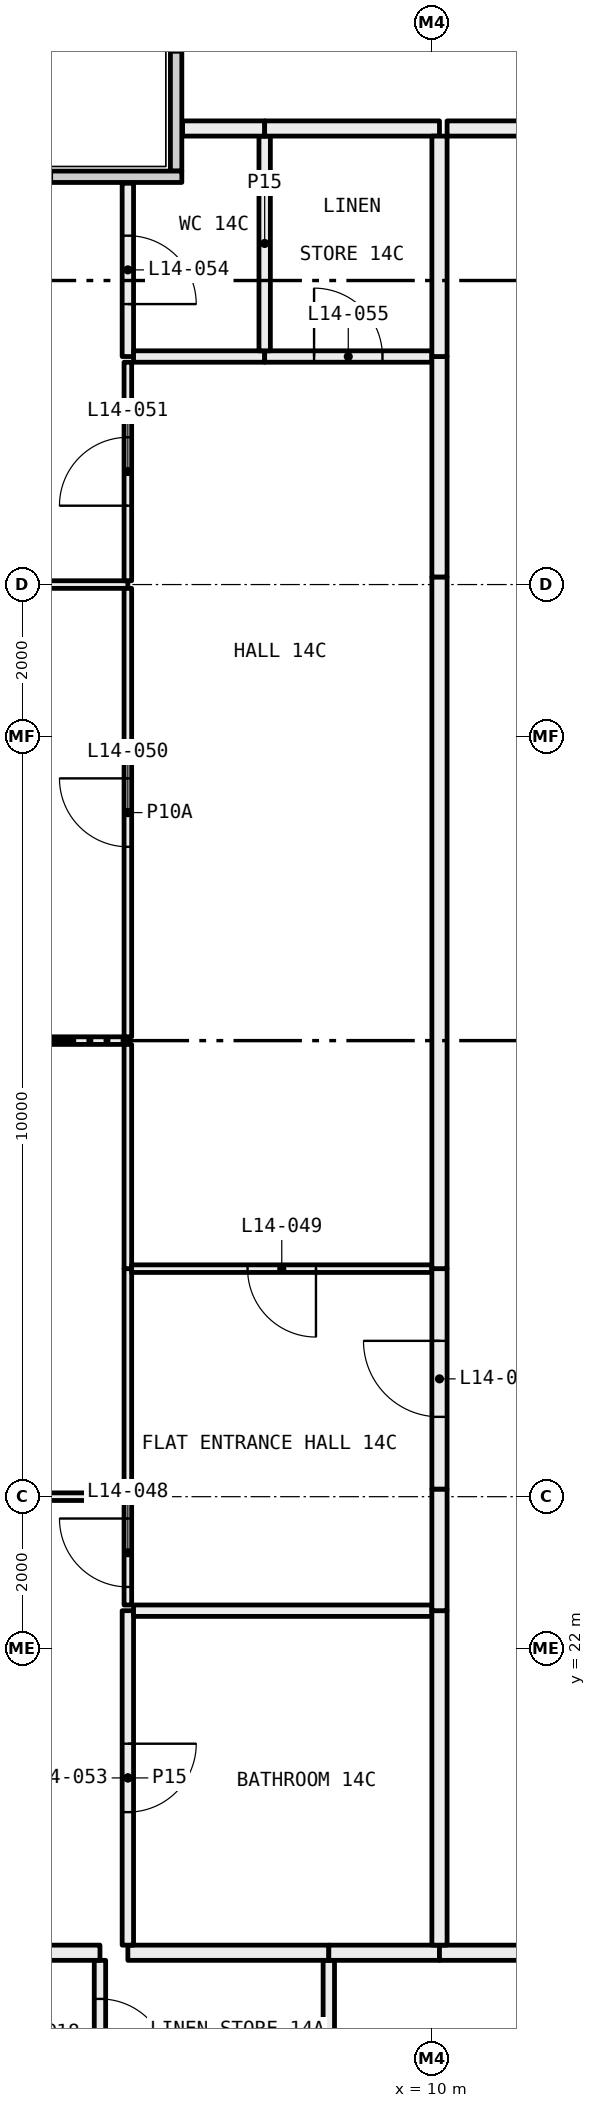
"""IFC4 building model, lengths in metres.
Left out: names, types, materials, properties, quantities, classifications, styles, units other than length and angle.
Written with IfcOpenShell. Run it as: python <this file> out.ifc"""

import sys

from ifc_helpers import new_model, si_unit, direction, frame, frame_2d, origin, place, context, subcontext, project, spatial, rectangle, extrude, element, fill, save


model = new_model("IFC4")
c1 = context("Model", 3, precision=1e-05, world=origin(), true_north=direction((0.0, 1.0)))
c2 = subcontext(c1, "Body", "Model", "MODEL_VIEW")
j1 = project(units=[si_unit("LENGTHUNIT", "METRE"), si_unit("PLANEANGLEUNIT", "RADIAN")], contexts=[c1])
p1 = place(None, origin())
s1 = spatial("IfcSite", under=j1, at=p1, CompositionType="ELEMENT")
p2 = place(p1, origin())
s2 = spatial("IfcBuilding", under=s1, at=p2, CompositionType="ELEMENT")
p3 = place(p2, frame((0.0, 0.0, 61.05)))
s3 = spatial("IfcBuildingStorey", under=s2, at=p3, CompositionType="ELEMENT", Elevation=61.05)
p4 = place(p3, frame((6.635, 41.44, 0.0), z_axis=(0.0, 0.0, 1.0), x_axis=(0.0, 1.0, 0.0)))
e1 = element("IfcWall", 1, at=p4, inside=s3, PredefinedType="ELEMENTEDWALL", context=c2, shape_type="SweptSolid", body=[
    extrude(rectangle(XDim=5.85, YDim=0.15, at=frame_2d((2.925, 0.0))), origin(), (0.0, 0.0, 1.0), 3.05),
])
p5 = place(p4, frame((1.56, 0.0, 0.45)))
e2 = element("IfcOpeningElement", 2, at=p5, cuts=e1, PredefinedType="OPENING", context=c2, shape_type="SweptSolid", body=[
    extrude(rectangle(XDim=4.0, YDim=2.55, at=frame_2d((2.0, 1.275))), frame((0.0, 0.085, 0.0), z_axis=(0.0, -1.0, 0.0), x_axis=(1.0, 0.0, 0.0)), (0.0, 0.0, 1.0), 0.17),
])
p6 = place(p3, frame((0.56, 41.365, 0.0), z_axis=(0.0, 0.0, 1.0), x_axis=(1.0, 0.0, 0.0)))
e3 = element("IfcWall", 3, at=p6, inside=s3, PredefinedType="ELEMENTEDWALL", context=c2, shape_type="SweptSolid", body=[
    extrude(rectangle(XDim=6.15, YDim=0.15, at=frame_2d((3.075, 0.0))), origin(), (0.0, 0.0, 1.0), 3.05),
])
p7 = place(p6, frame((0.44, 0.0, 0.45)))
e4 = element("IfcOpeningElement", 4, at=p7, cuts=e3, PredefinedType="OPENING", context=c2, shape_type="SweptSolid", body=[
    extrude(rectangle(XDim=4.0, YDim=2.55, at=frame_2d((2.0, 1.275))), frame((0.0, 0.085, 0.0), z_axis=(0.0, -1.0, 0.0), x_axis=(1.0, 0.0, 0.0)), (0.0, 0.0, 1.0), 0.17),
])
p8 = place(p3, frame((5.633, 15.985, 0.0), z_axis=(0.0, 0.0, 1.0), x_axis=(0.0, 1.0, 0.0)))
e5 = element("IfcWall", 5, at=p8, inside=s3, PredefinedType="PARTITIONING", context=c2, shape_type="SweptSolid", body=[
    extrude(rectangle(XDim=1.915, YDim=0.15, at=frame_2d((0.958, 0.0))), origin(), (0.0, 0.0, 1.0), 3.05),
])
p9 = place(p8, frame((0.508, 0.0, 0.0)))
e6 = element("IfcOpeningElement", 6, at=p9, cuts=e5, PredefinedType="OPENING", context=c2, shape_type="SweptSolid", body=[
    extrude(rectangle(XDim=0.9, YDim=2.1, at=frame_2d((0.45, 1.05))), frame((0.0, 0.085, 0.0), z_axis=(0.0, -1.0, 0.0), x_axis=(1.0, 0.0, 0.0)), (0.0, 0.0, 1.0), 0.17),
])
p10 = place(p3, frame((5.633, 18.0, 0.0), z_axis=(0.0, 0.0, 1.0), x_axis=(-1.0, 0.0, 0.0)))
e7 = element("IfcWall", 7, at=p10, inside=s3, PredefinedType="PARTITIONING", context=c2, shape_type="SweptSolid", body=[
    extrude(rectangle(XDim=4.913, YDim=0.2, at=frame_2d((2.457, 0.0))), origin(), (0.0, 0.0, 1.0), 3.05),
])
p11 = place(p3, frame((8.644, 16.06, 0.0), z_axis=(0.0, 0.0, 1.0), x_axis=(0.0, 1.0, 0.0)))
e8 = element("IfcWall", 8, at=p11, inside=s3, PredefinedType="PARTITIONING", context=c2, shape_type="SweptSolid", body=[
    extrude(rectangle(XDim=1.84, YDim=0.15, at=frame_2d((0.92, 0.0))), origin(), (0.0, 0.0, 1.0), 3.05),
])
p12 = place(p3, frame((8.644, 18.0, 0.0), z_axis=(0.0, 0.0, 1.0), x_axis=(-1.0, 0.0, 0.0)))
e9 = element("IfcWall", 9, at=p12, inside=s3, PredefinedType="PARTITIONING", context=c2, shape_type="SweptSolid", body=[
    extrude(rectangle(XDim=2.644, YDim=0.2, at=frame_2d((1.322, 0.0))), origin(), (0.0, 0.0, 1.0), 3.05),
])
p13 = place(p3, frame((10.1, 18.0, 0.0), z_axis=(0.0, 0.0, 1.0), x_axis=(-1.0, 0.0, 0.0)))
e10 = element("IfcWall", 10, at=p13, inside=s3, PredefinedType="PARTITIONING", context=c2, shape_type="SweptSolid", body=[
    extrude(rectangle(XDim=1.456, YDim=0.2, at=frame_2d((0.728, 0.0))), origin(), (0.0, 0.0, 1.0), 3.05),
])
p14 = place(p3, frame((13.5, 18.0, 0.0), z_axis=(0.0, 0.0, 1.0), x_axis=(-1.0, 0.0, 0.0)))
e11 = element("IfcWall", 11, at=p14, inside=s3, PredefinedType="PARTITIONING", context=c2, shape_type="SweptSolid", body=[
    extrude(rectangle(XDim=3.4, YDim=0.2, at=frame_2d((1.7, 0.0))), origin(), (0.0, 0.0, 1.0), 3.05),
])
p15 = place(p3, frame((6.0, 24.0, 0.0), z_axis=(0.0, 0.0, 1.0), x_axis=(-1.0, 0.0, 0.0)))
e12 = element("IfcWall", 12, at=p15, inside=s3, PredefinedType="PARTITIONING", context=c2, shape_type="SweptSolid", body=[
    extrude(rectangle(XDim=5.28, YDim=0.1, at=frame_2d((2.64, 0.0))), origin(), (0.0, 0.0, 1.0), 2.45),
])
p16 = place(p15, frame((2.19, 0.0, 0.0)))
e13 = element("IfcOpeningElement", 13, at=p16, cuts=e12, PredefinedType="OPENING", context=c2, shape_type="SweptSolid", body=[
    extrude(rectangle(XDim=0.9, YDim=2.1, at=frame_2d((0.45, 1.05))), frame((0.0, 0.06, 0.0), z_axis=(0.0, -1.0, 0.0), x_axis=(1.0, 0.0, 0.0)), (0.0, 0.0, 1.0), 0.12),
])
p17 = place(p3, frame((6.0, 18.1, 0.0), z_axis=(0.0, 0.0, 1.0), x_axis=(0.0, 1.0, 0.0)))
e14 = element("IfcWall", 14, at=p17, inside=s3, PredefinedType="PARTITIONING", context=c2, shape_type="SweptSolid", body=[
    extrude(rectangle(XDim=4.4, YDim=0.15, at=frame_2d((2.2, 0.0))), origin(), (0.0, 0.0, 1.0), 3.05),
])
p18 = place(p17, frame((1.75, 0.0, 0.0)))
e15 = element("IfcOpeningElement", 15, at=p18, cuts=e14, PredefinedType="OPENING", context=c2, shape_type="SweptSolid", body=[
    extrude(rectangle(XDim=0.9, YDim=2.1, at=frame_2d((0.45, 1.05))), frame((0.0, 0.085, 0.0), z_axis=(0.0, -1.0, 0.0), x_axis=(1.0, 0.0, 0.0)), (0.0, 0.0, 1.0), 0.17),
])
p19 = place(p3, frame((6.0, 22.575, 0.0), z_axis=(0.0, 0.0, 1.0), x_axis=(0.0, 1.0, 0.0)))
e16 = element("IfcWall", 16, at=p19, inside=s3, PredefinedType="PARTITIONING", context=c2, shape_type="SweptSolid", body=[
    extrude(rectangle(XDim=1.375, YDim=0.1, at=frame_2d((0.688, 0.0))), origin(), (0.0, 0.0, 1.0), 2.45),
])
p20 = place(p19, frame((0.238, 0.0, 0.0)))
e17 = element("IfcOpeningElement", 17, at=p20, cuts=e16, PredefinedType="OPENING", context=c2, shape_type="SweptSolid", body=[
    extrude(rectangle(XDim=0.9, YDim=2.1, at=frame_2d((0.45, 1.05))), frame((0.0, 0.06, 0.0), z_axis=(0.0, -1.0, 0.0), x_axis=(1.0, 0.0, 0.0)), (0.0, 0.0, 1.0), 0.12),
])
p21 = place(p3, frame((6.0, 30.0, 0.0), z_axis=(0.0, 0.0, 1.0), x_axis=(-1.0, 0.0, 0.0)))
e18 = element("IfcWall", 18, at=p21, inside=s3, PredefinedType="PARTITIONING", context=c2, shape_type="SweptSolid", body=[
    extrude(rectangle(XDim=5.28, YDim=0.1, at=frame_2d((2.64, 0.0))), origin(), (0.0, 0.0, 1.0), 3.05),
])
p22 = place(p3, frame((6.0, 24.05, 0.0), z_axis=(0.0, 0.0, 1.0), x_axis=(0.0, 1.0, 0.0)))
e19 = element("IfcWall", 19, at=p22, inside=s3, PredefinedType="PARTITIONING", context=c2, shape_type="SweptSolid", body=[
    extrude(rectangle(XDim=2.95, YDim=0.1, at=frame_2d((1.475, 0.0))), origin(), (0.0, 0.0, 1.0), 2.45),
])
p23 = place(p3, frame((6.0, 27.0, 0.0), z_axis=(0.0, 0.0, 1.0), x_axis=(0.0, 1.0, 0.0)))
e20 = element("IfcWall", 20, at=p23, inside=s3, PredefinedType="PARTITIONING", context=c2, shape_type="SweptSolid", body=[
    extrude(rectangle(XDim=2.95, YDim=0.1, at=frame_2d((1.475, 0.0))), origin(), (0.0, 0.0, 1.0), 3.05),
])
p24 = place(p3, frame((6.0, 36.0, 0.0), z_axis=(0.0, 0.0, 1.0), x_axis=(-1.0, 0.0, 0.0)))
e21 = element("IfcWall", 21, at=p24, inside=s3, PredefinedType="PARTITIONING", context=c2, shape_type="SweptSolid", body=[
    extrude(rectangle(XDim=5.28, YDim=0.1, at=frame_2d((2.64, 0.0))), origin(), (0.0, 0.0, 1.0), 2.45),
])
p25 = place(p3, frame((6.0, 30.05, 0.0), z_axis=(0.0, 0.0, 1.0), x_axis=(0.0, 1.0, 0.0)))
e22 = element("IfcWall", 22, at=p25, inside=s3, PredefinedType="PARTITIONING", context=c2, shape_type="SweptSolid", body=[
    extrude(rectangle(XDim=5.9, YDim=0.1, at=frame_2d((2.95, 0.0))), origin(), (0.0, 0.0, 1.0), 2.45),
])
p26 = place(p25, frame((2.5, 0.0, 0.0)))
e23 = element("IfcOpeningElement", 23, at=p26, cuts=e22, PredefinedType="OPENING", context=c2, shape_type="SweptSolid", body=[
    extrude(rectangle(XDim=0.9, YDim=2.1, at=frame_2d((0.45, 1.05))), frame((0.0, 0.06, 0.0), z_axis=(0.0, -1.0, 0.0), x_axis=(1.0, 0.0, 0.0)), (0.0, 0.0, 1.0), 0.12),
])
p27 = place(p3, frame((6.0, 36.05, 0.0), z_axis=(0.0, 0.0, 1.0), x_axis=(0.0, 1.0, 0.0)))
e24 = element("IfcWall", 24, at=p27, inside=s3, PredefinedType="PARTITIONING", context=c2, shape_type="SweptSolid", body=[
    extrude(rectangle(XDim=2.875, YDim=0.1, at=frame_2d((1.438, 0.0))), origin(), (0.0, 0.0, 1.0), 2.45),
])
p28 = place(p27, frame((0.988, 0.0, 0.0)))
e25 = element("IfcOpeningElement", 25, at=p28, cuts=e24, PredefinedType="OPENING", context=c2, shape_type="SweptSolid", body=[
    extrude(rectangle(XDim=0.9, YDim=2.1, at=frame_2d((0.45, 1.05))), frame((0.0, 0.06, 0.0), z_axis=(0.0, -1.0, 0.0), x_axis=(1.0, 0.0, 0.0)), (0.0, 0.0, 1.0), 0.12),
])
p29 = place(p3, frame((6.0, 39.0, 0.0), z_axis=(0.0, 0.0, 1.0), x_axis=(0.0, 1.0, 0.0)))
e26 = element("IfcWall", 26, at=p29, inside=s3, PredefinedType="PARTITIONING", context=c2, shape_type="SweptSolid", body=[
    extrude(rectangle(XDim=2.28, YDim=0.15, at=frame_2d((1.14, 0.0))), origin(), (0.0, 0.0, 1.0), 3.05),
])
p30 = place(p29, frame((0.69, 0.0, 0.0)))
e27 = element("IfcOpeningElement", 27, at=p30, cuts=e26, PredefinedType="OPENING", context=c2, shape_type="SweptSolid", body=[
    extrude(rectangle(XDim=0.9, YDim=2.1, at=frame_2d((0.45, 1.05))), frame((0.0, 0.085, 0.0), z_axis=(0.0, -1.0, 0.0), x_axis=(1.0, 0.0, 0.0)), (0.0, 0.0, 1.0), 0.17),
])
p31 = place(p3, frame((10.0, 22.5, 0.0), z_axis=(0.0, 0.0, 1.0), x_axis=(-1.0, 0.0, 0.0)))
e28 = element("IfcWall", 28, at=p31, inside=s3, PredefinedType="PARTITIONING", context=c2, shape_type="SweptSolid", body=[
    extrude(rectangle(XDim=3.925, YDim=0.15, at=frame_2d((1.962, 0.0))), origin(), (0.0, 0.0, 1.0), 3.05),
])
p32 = place(p3, frame((10.1, 18.1, 0.0), z_axis=(0.0, 0.0, 1.0), x_axis=(0.0, 1.0, 0.0)))
e29 = element("IfcWall", 29, at=p32, inside=s3, PredefinedType="PARTITIONING", context=c2, shape_type="SweptSolid", body=[
    extrude(rectangle(XDim=4.4, YDim=0.2, at=frame_2d((2.2, 0.0))), origin(), (0.0, 0.0, 1.0), 3.05),
])
p33 = place(p3, frame((10.0, 27.0, 0.0), z_axis=(0.0, 0.0, 1.0), x_axis=(-1.0, 0.0, 0.0)))
e30 = element("IfcWall", 30, at=p33, inside=s3, PredefinedType="PARTITIONING", context=c2, shape_type="SweptSolid", body=[
    extrude(rectangle(XDim=3.95, YDim=0.1, at=frame_2d((1.975, 0.0))), origin(), (0.0, 0.0, 1.0), 3.05),
])
p34 = place(p33, frame((1.525, 0.0, 0.0)))
e31 = element("IfcOpeningElement", 31, at=p34, cuts=e30, PredefinedType="OPENING", context=c2, shape_type="SweptSolid", body=[
    extrude(rectangle(XDim=0.9, YDim=2.1, at=frame_2d((0.45, 1.05))), frame((0.0, 0.06, 0.0), z_axis=(0.0, -1.0, 0.0), x_axis=(1.0, 0.0, 0.0)), (0.0, 0.0, 1.0), 0.12),
])
p35 = place(p3, frame((10.1, 22.5, 0.0), z_axis=(0.0, 0.0, 1.0), x_axis=(0.0, 1.0, 0.0)))
e32 = element("IfcWall", 32, at=p35, inside=s3, PredefinedType="PARTITIONING", context=c2, shape_type="SweptSolid", body=[
    extrude(rectangle(XDim=1.6, YDim=0.2, at=frame_2d((0.8, 0.0))), origin(), (0.0, 0.0, 1.0), 2.45),
])
p36 = place(p3, frame((10.1, 24.1, 0.0), z_axis=(0.0, 0.0, 1.0), x_axis=(0.0, 1.0, 0.0)))
e33 = element("IfcWall", 33, at=p36, inside=s3, PredefinedType="PARTITIONING", context=c2, shape_type="SweptSolid", body=[
    extrude(rectangle(XDim=2.9, YDim=0.2, at=frame_2d((1.45, 0.0))), origin(), (0.0, 0.0, 1.0), 3.05),
])
p37 = place(p36, frame((0.95, 0.0, 0.0)))
e34 = element("IfcOpeningElement", 34, at=p37, cuts=e33, PredefinedType="OPENING", context=c2, shape_type="SweptSolid", body=[
    extrude(rectangle(XDim=1.0, YDim=2.1, at=frame_2d((0.5, 1.05))), frame((0.0, 0.11, 0.0), z_axis=(0.0, -1.0, 0.0), x_axis=(1.0, 0.0, 0.0)), (0.0, 0.0, 1.0), 0.22),
])
p38 = place(p3, frame((7.8, 39.0, 0.0), z_axis=(0.0, 0.0, 1.0), x_axis=(-1.0, 0.0, 0.0)))
e35 = element("IfcWall", 35, at=p38, inside=s3, PredefinedType="PARTITIONING", context=c2, shape_type="SweptSolid", body=[
    extrude(rectangle(XDim=1.725, YDim=0.15, at=frame_2d((0.863, 0.0))), origin(), (0.0, 0.0, 1.0), 3.05),
])
p39 = place(p3, frame((10.0, 39.0, 0.0), z_axis=(0.0, 0.0, 1.0), x_axis=(-1.0, 0.0, 0.0)))
e36 = element("IfcWall", 36, at=p39, inside=s3, PredefinedType="PARTITIONING", context=c2, shape_type="SweptSolid", body=[
    extrude(rectangle(XDim=2.2, YDim=0.15, at=frame_2d((1.1, 0.0))), origin(), (0.0, 0.0, 1.0), 3.05),
])
p40 = place(p39, frame((0.65, 0.0, 0.0)))
e37 = element("IfcOpeningElement", 37, at=p40, cuts=e36, PredefinedType="OPENING", context=c2, shape_type="SweptSolid", body=[
    extrude(rectangle(XDim=0.9, YDim=2.1, at=frame_2d((0.45, 1.05))), frame((0.0, 0.085, 0.0), z_axis=(0.0, -1.0, 0.0), x_axis=(1.0, 0.0, 0.0)), (0.0, 0.0, 1.0), 0.17),
])
p41 = place(p3, frame((10.1, 27.0, 0.0), z_axis=(0.0, 0.0, 1.0), x_axis=(0.0, 1.0, 0.0)))
e38 = element("IfcWall", 38, at=p41, inside=s3, PredefinedType="PARTITIONING", context=c2, shape_type="SweptSolid", body=[
    extrude(rectangle(XDim=9.1, YDim=0.2, at=frame_2d((4.55, 0.0))), origin(), (0.0, 0.0, 1.0), 2.45),
])
p42 = place(p3, frame((10.1, 36.1, 0.0), z_axis=(0.0, 0.0, 1.0), x_axis=(0.0, 1.0, 0.0)))
e39 = element("IfcWall", 39, at=p42, inside=s3, PredefinedType="PARTITIONING", context=c2, shape_type="SweptSolid", body=[
    extrude(rectangle(XDim=2.9, YDim=0.2, at=frame_2d((1.45, 0.0))), origin(), (0.0, 0.0, 1.0), 3.05),
])
p43 = place(p3, frame((7.8, 39.075, 0.0), z_axis=(0.0, 0.0, 1.0), x_axis=(0.0, 1.0, 0.0)))
e40 = element("IfcWall", 40, at=p43, inside=s3, PredefinedType="PARTITIONING", context=c2, shape_type="SweptSolid", body=[
    extrude(rectangle(XDim=2.825, YDim=0.15, at=frame_2d((1.413, 0.0))), origin(), (0.0, 0.0, 1.0), 3.05),
])
p44 = place(p3, frame((7.8, 42.0, 0.0), z_axis=(0.0, 0.0, 1.0), x_axis=(-1.0, 0.0, 0.0)))
e41 = element("IfcWall", 41, at=p44, inside=s3, PredefinedType="PARTITIONING", context=c2, shape_type="SweptSolid", body=[
    extrude(rectangle(XDim=1.08, YDim=0.2, at=frame_2d((0.54, 0.0))), origin(), (0.0, 0.0, 1.0), 3.05),
])
p45 = place(p3, frame((10.1, 42.0, 0.0), z_axis=(0.0, 0.0, 1.0), x_axis=(-1.0, 0.0, 0.0)))
e42 = element("IfcWall", 42, at=p45, inside=s3, PredefinedType="PARTITIONING", context=c2, shape_type="SweptSolid", body=[
    extrude(rectangle(XDim=2.3, YDim=0.2, at=frame_2d((1.15, 0.0))), origin(), (0.0, 0.0, 1.0), 3.05),
])
p46 = place(p3, frame((10.1, 39.0, 0.0), z_axis=(0.0, 0.0, 1.0), x_axis=(0.0, 1.0, 0.0)))
e43 = element("IfcWall", 43, at=p46, inside=s3, PredefinedType="PARTITIONING", context=c2, shape_type="SweptSolid", body=[
    extrude(rectangle(XDim=2.9, YDim=0.2, at=frame_2d((1.45, 0.0))), origin(), (0.0, 0.0, 1.0), 3.05),
])
p47 = place(p3, frame((10.2, 42.0, 0.0), z_axis=(0.0, 0.0, 1.0), x_axis=(1.0, 0.0, 0.0)))
e44 = element("IfcWall", 44, at=p47, inside=s3, PredefinedType="PARTITIONING", context=c2, shape_type="SweptSolid", body=[
    extrude(rectangle(XDim=1.8, YDim=0.2, at=frame_2d((0.9, 0.0))), origin(), (0.0, 0.0, 1.0), 3.05),
])
p48 = place(p9, frame((0.9, 0.0, 0.0), x_axis=(-1.0, 0.0, 0.0)))
e45 = element("IfcDoor", 45, at=p48, inside=s3, OperationType="SINGLE_SWING_LEFT", PredefinedType="DOOR", context=c2, shape_type="SweptSolid", body=[
    extrude(rectangle(XDim=0.9, YDim=2.1, at=frame_2d((0.45, 1.05))), frame((0.0, 0.025, 0.0), z_axis=(0.0, -1.0, 0.0), x_axis=(1.0, 0.0, 0.0)), (0.0, 0.0, 1.0), 0.05),
])
fill(e6, e45)
p49 = place(p37, origin())
e46 = element("IfcDoor", 46, at=p49, inside=s3, OperationType="SINGLE_SWING_LEFT", PredefinedType="DOOR", context=c2, shape_type="SweptSolid", body=[
    extrude(rectangle(XDim=1.0, YDim=2.1, at=frame_2d((0.5, 1.05))), frame((0.0, 0.025, 0.0), z_axis=(0.0, -1.0, 0.0), x_axis=(1.0, 0.0, 0.0)), (0.0, 0.0, 1.0), 0.05),
])
fill(e34, e46)
p50 = place(p20, origin())
e47 = element("IfcDoor", 47, at=p50, inside=s3, OperationType="SINGLE_SWING_LEFT", PredefinedType="DOOR", context=c2, shape_type="SweptSolid", body=[
    extrude(rectangle(XDim=0.9, YDim=2.1, at=frame_2d((0.45, 1.05))), frame((0.0, 0.025, 0.0), z_axis=(0.0, -1.0, 0.0), x_axis=(1.0, 0.0, 0.0)), (0.0, 0.0, 1.0), 0.05),
])
fill(e17, e47)
p51 = place(p34, origin())
e48 = element("IfcDoor", 48, at=p51, inside=s3, OperationType="SINGLE_SWING_RIGHT", PredefinedType="DOOR", context=c2, shape_type="SweptSolid", body=[
    extrude(rectangle(XDim=0.9, YDim=2.1, at=frame_2d((0.45, 1.05))), frame((0.0, 0.025, 0.0), z_axis=(0.0, -1.0, 0.0), x_axis=(1.0, 0.0, 0.0)), (0.0, 0.0, 1.0), 0.05),
])
fill(e31, e48)
p52 = place(p26, origin())
e49 = element("IfcDoor", 49, at=p52, inside=s3, OperationType="SINGLE_SWING_LEFT", PredefinedType="DOOR", context=c2, shape_type="SweptSolid", body=[
    extrude(rectangle(XDim=0.9, YDim=2.1, at=frame_2d((0.45, 1.05))), frame((0.0, 0.025, 0.0), z_axis=(0.0, -1.0, 0.0), x_axis=(1.0, 0.0, 0.0)), (0.0, 0.0, 1.0), 0.05),
])
fill(e23, e49)
p53 = place(p28, origin())
e50 = element("IfcDoor", 50, at=p53, inside=s3, OperationType="SINGLE_SWING_RIGHT", PredefinedType="DOOR", context=c2, shape_type="SweptSolid", body=[
    extrude(rectangle(XDim=0.9, YDim=2.1, at=frame_2d((0.45, 1.05))), frame((0.0, 0.025, 0.0), z_axis=(0.0, -1.0, 0.0), x_axis=(1.0, 0.0, 0.0)), (0.0, 0.0, 1.0), 0.05),
])
fill(e25, e50)
p54 = place(p18, frame((0.9, 0.0, 0.0), x_axis=(-1.0, 0.0, 0.0)))
e51 = element("IfcDoor", 51, at=p54, inside=s3, OperationType="SINGLE_SWING_RIGHT", PredefinedType="DOOR", context=c2, shape_type="SweptSolid", body=[
    extrude(rectangle(XDim=0.9, YDim=2.1, at=frame_2d((0.45, 1.05))), frame((0.0, 0.025, 0.0), z_axis=(0.0, -1.0, 0.0), x_axis=(1.0, 0.0, 0.0)), (0.0, 0.0, 1.0), 0.05),
])
fill(e15, e51)
p55 = place(p30, frame((0.9, 0.0, 0.0), x_axis=(-1.0, 0.0, 0.0)))
e52 = element("IfcDoor", 52, at=p55, inside=s3, OperationType="SINGLE_SWING_LEFT", PredefinedType="DOOR", context=c2, shape_type="SweptSolid", body=[
    extrude(rectangle(XDim=0.9, YDim=2.1, at=frame_2d((0.45, 1.05))), frame((0.0, 0.025, 0.0), z_axis=(0.0, -1.0, 0.0), x_axis=(1.0, 0.0, 0.0)), (0.0, 0.0, 1.0), 0.05),
])
fill(e27, e52)
p56 = place(p40, frame((0.9, 0.0, 0.0), x_axis=(-1.0, 0.0, 0.0)))
e53 = element("IfcDoor", 53, at=p56, inside=s3, OperationType="SINGLE_SWING_RIGHT", PredefinedType="DOOR", context=c2, shape_type="SweptSolid", body=[
    extrude(rectangle(XDim=0.9, YDim=2.1, at=frame_2d((0.45, 1.05))), frame((0.0, 0.025, 0.0), z_axis=(0.0, -1.0, 0.0), x_axis=(1.0, 0.0, 0.0)), (0.0, 0.0, 1.0), 0.05),
])
fill(e37, e53)
save(model, sys.argv[1])
